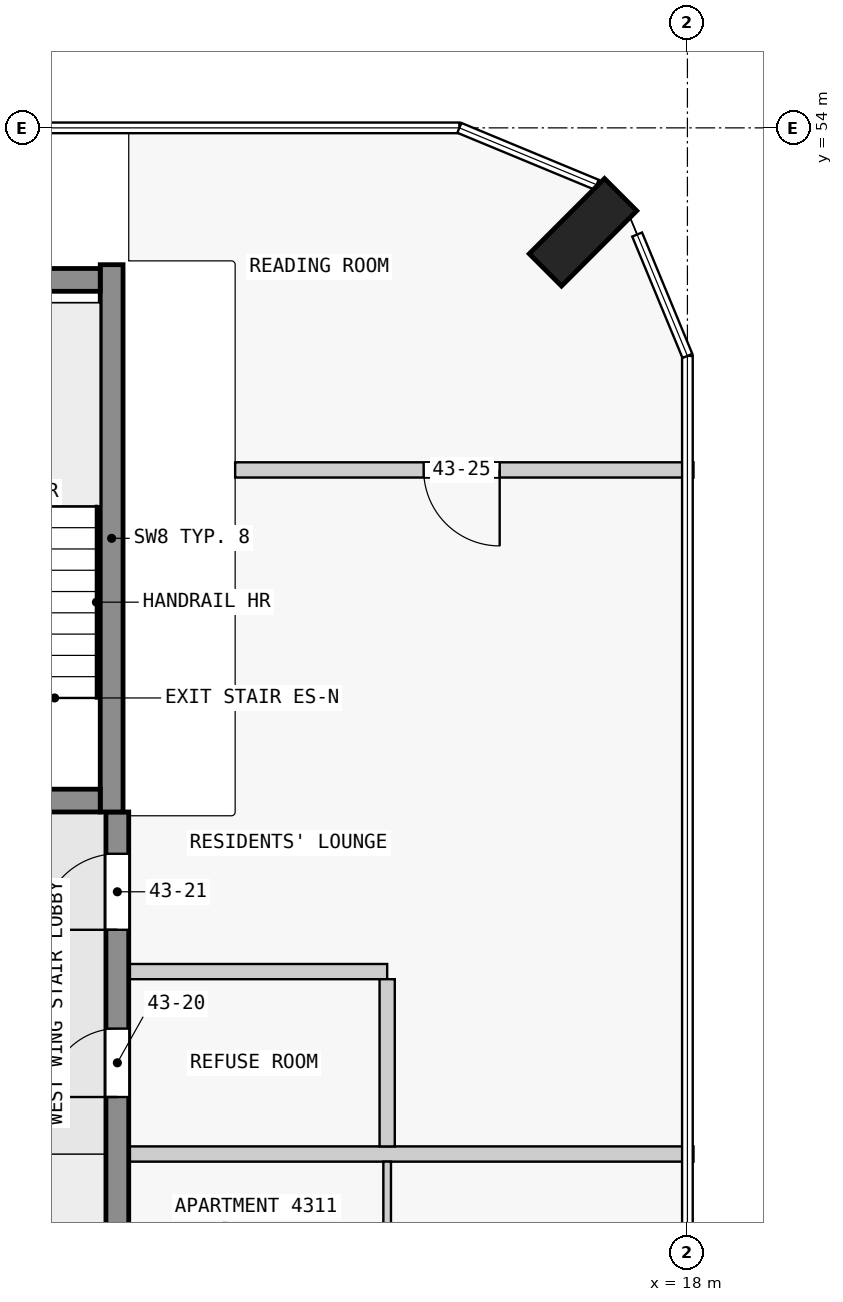
"""IFC4 building model, lengths in metres.
Left out: names, types, materials, properties, quantities, classifications, styles, units other than length and angle.
Written with IfcOpenShell. Run it as: python <this file> out.ifc"""

import sys

from ifc_helpers import new_model, si_unit, direction, frame, frame_2d, origin, origin_2d, place, context, subcontext, project, spatial, rectangle, extrude, element, fill, save


model = new_model("IFC4")
c1 = context("Model", 3, precision=1e-05, world=origin(), true_north=direction((0.0, 1.0)))
c2 = subcontext(c1, "Body", "Model", "MODEL_VIEW")
j1 = project(units=[si_unit("LENGTHUNIT", "METRE"), si_unit("PLANEANGLEUNIT", "RADIAN")], contexts=[c1])
p1 = place(None, origin())
s1 = spatial("IfcSite", under=j1, at=p1, CompositionType="ELEMENT")
p2 = place(p1, origin())
s2 = spatial("IfcBuilding", under=s1, at=p2, CompositionType="ELEMENT")
p3 = place(p2, frame((0.0, 0.0, 167.4)))
s3 = spatial("IfcBuildingStorey", under=s2, at=p3, CompositionType="ELEMENT", Elevation=167.4)
p4 = place(p3, frame((16.626, 52.626, 0.0), z_axis=(0.0, 0.0, 1.0), x_axis=(-0.707106781187, 0.707106781187, 0.0)))
e1 = element("IfcColumn", 1, at=p4, inside=s3, PredefinedType="COLUMN", context=c2, shape_type="SweptSolid", body=[
    extrude(rectangle(XDim=0.6, YDim=1.4, at=origin_2d()), origin(), (0.0, 0.0, 1.0), 3.5),
])
p5 = place(p3, frame((7.725, 45.15, 0.0), z_axis=(0.0, 0.0, 1.0), x_axis=(1.0, 0.0, 0.0)))
e2 = element("IfcWall", 2, at=p5, inside=s3, PredefinedType="SHEAR", context=c2, shape_type="SweptSolid", body=[
    extrude(rectangle(XDim=2.55, YDim=0.3, at=frame_2d((1.275, 0.0))), origin(), (0.0, 0.0, 1.0), 3.5),
])
p6 = place(p5, frame((0.725, 0.0, 0.0)))
e3 = element("IfcOpeningElement", 3, at=p6, cuts=e2, PredefinedType="OPENING", context=c2, shape_type="SweptSolid", body=[
    extrude(rectangle(XDim=1.1, YDim=2.1, at=frame_2d((0.55, 1.05))), frame((0.0, 0.16, 0.0), z_axis=(0.0, -1.0, 0.0), x_axis=(1.0, 0.0, 0.0)), (0.0, 0.0, 1.0), 0.32),
])
p7 = place(p3, frame((7.725, 52.0, 0.0), z_axis=(0.0, 0.0, 1.0), x_axis=(1.0, 0.0, 0.0)))
e4 = element("IfcWall", 4, at=p7, inside=s3, PredefinedType="SHEAR", context=c2, shape_type="SweptSolid", body=[
    extrude(rectangle(XDim=2.55, YDim=0.3, at=frame_2d((1.275, 0.0))), origin(), (0.0, 0.0, 1.0), 3.5),
])
p8 = place(p3, frame((10.425, 45.0, 0.0), z_axis=(0.0, 0.0, 1.0), x_axis=(0.0, 1.0, 0.0)))
e5 = element("IfcWall", 5, at=p8, inside=s3, PredefinedType="SHEAR", context=c2, shape_type="SweptSolid", body=[
    extrude(rectangle(XDim=7.2, YDim=0.3, at=frame_2d((3.6, 0.0))), origin(), (0.0, 0.0, 1.0), 3.5),
])
p9 = place(p3, frame((10.5, 18.0, 0.0), z_axis=(0.0, 0.0, 1.0), x_axis=(0.0, 1.0, 0.0)))
e6 = element("IfcWall", 6, at=p9, inside=s3, PredefinedType="SHEAR", context=c2, shape_type="SweptSolid", body=[
    extrude(rectangle(XDim=27.0, YDim=0.3, at=frame_2d((13.5, 0.0))), origin(), (0.0, 0.0, 1.0), 3.25),
])
p10 = place(p9, frame((1.75, 0.0, 0.0)))
e7 = element("IfcOpeningElement", 7, at=p10, cuts=e6, PredefinedType="OPENING", context=c2, shape_type="SweptSolid", body=[
    extrude(rectangle(XDim=1.0, YDim=2.1, at=frame_2d((0.5, 1.05))), frame((0.0, 0.16, 0.0), z_axis=(0.0, -1.0, 0.0), x_axis=(1.0, 0.0, 0.0)), (0.0, 0.0, 1.0), 0.32),
])
p11 = place(p9, frame((6.25, 0.0, 0.0)))
e8 = element("IfcOpeningElement", 8, at=p11, cuts=e6, PredefinedType="OPENING", context=c2, shape_type="SweptSolid", body=[
    extrude(rectangle(XDim=1.0, YDim=2.1, at=frame_2d((0.5, 1.05))), frame((0.0, 0.16, 0.0), z_axis=(0.0, -1.0, 0.0), x_axis=(1.0, 0.0, 0.0)), (0.0, 0.0, 1.0), 0.32),
])
p12 = place(p9, frame((10.35, 0.0, 0.0)))
e9 = element("IfcOpeningElement", 9, at=p12, cuts=e6, PredefinedType="OPENING", context=c2, shape_type="SweptSolid", body=[
    extrude(rectangle(XDim=1.8, YDim=2.1, at=frame_2d((0.9, 1.05))), frame((0.0, 0.16, 0.0), z_axis=(0.0, -1.0, 0.0), x_axis=(1.0, 0.0, 0.0)), (0.0, 0.0, 1.0), 0.32),
])
p13 = place(p9, frame((17.55, 0.0, 0.0)))
e10 = element("IfcOpeningElement", 10, at=p13, cuts=e6, PredefinedType="OPENING", context=c2, shape_type="SweptSolid", body=[
    extrude(rectangle(XDim=1.0, YDim=2.1, at=frame_2d((0.5, 1.05))), frame((0.0, 0.16, 0.0), z_axis=(0.0, -1.0, 0.0), x_axis=(1.0, 0.0, 0.0)), (0.0, 0.0, 1.0), 0.32),
])
p14 = place(p9, frame((23.25, 0.0, 0.0)))
e11 = element("IfcOpeningElement", 11, at=p14, cuts=e6, PredefinedType="OPENING", context=c2, shape_type="SweptSolid", body=[
    extrude(rectangle(XDim=0.9, YDim=2.1, at=frame_2d((0.45, 1.05))), frame((0.0, 0.16, 0.0), z_axis=(0.0, -1.0, 0.0), x_axis=(1.0, 0.0, 0.0)), (0.0, 0.0, 1.0), 0.32),
])
p15 = place(p9, frame((25.45, 0.0, 0.0)))
e12 = element("IfcOpeningElement", 12, at=p15, cuts=e6, PredefinedType="OPENING", context=c2, shape_type="SweptSolid", body=[
    extrude(rectangle(XDim=1.0, YDim=2.1, at=frame_2d((0.5, 1.05))), frame((0.0, 0.16, 0.0), z_axis=(0.0, -1.0, 0.0), x_axis=(1.0, 0.0, 0.0)), (0.0, 0.0, 1.0), 0.32),
])
p16 = place(p3, frame((18.08, 40.5, 0.0), z_axis=(0.0, 0.0, 1.0), x_axis=(-1.0, 0.0, 0.0)))
e13 = element("IfcWall", 13, at=p16, inside=s3, PredefinedType="PARTITIONING", context=c2, shape_type="SweptSolid", body=[
    extrude(rectangle(XDim=7.43, YDim=0.2, at=frame_2d((3.715, 0.0))), origin(), (0.0, 0.0, 1.0), 3.25),
])
p17 = place(p3, frame((14.05, 42.9, 0.0), z_axis=(0.0, 0.0, 1.0), x_axis=(-1.0, 0.0, 0.0)))
e14 = element("IfcWall", 14, at=p17, inside=s3, PredefinedType="PARTITIONING", context=c2, shape_type="SweptSolid", body=[
    extrude(rectangle(XDim=3.4, YDim=0.2, at=frame_2d((1.7, 0.0))), origin(), (0.0, 0.0, 1.0), 3.25),
])
p18 = place(p3, frame((18.08, 49.5, 0.0), z_axis=(0.0, 0.0, 1.0), x_axis=(-1.0, 0.0, 0.0)))
e15 = element("IfcWall", 15, at=p18, inside=s3, PredefinedType="PARTITIONING", context=c2, shape_type="SweptSolid", body=[
    extrude(rectangle(XDim=6.03, YDim=0.2, at=frame_2d((3.015, 0.0))), origin(), (0.0, 0.0, 1.0), 3.25),
])
p19 = place(p18, frame((2.55, 0.0, 0.0)))
e16 = element("IfcOpeningElement", 16, at=p19, cuts=e15, PredefinedType="OPENING", context=c2, shape_type="SweptSolid", body=[
    extrude(rectangle(XDim=1.0, YDim=2.1, at=frame_2d((0.5, 1.05))), frame((0.0, 0.11, 0.0), z_axis=(0.0, -1.0, 0.0), x_axis=(1.0, 0.0, 0.0)), (0.0, 0.0, 1.0), 0.22),
])
p20 = place(p3, frame((14.05, 38.75, 0.0), z_axis=(0.0, 0.0, 1.0), x_axis=(0.0, 1.0, 0.0)))
e17 = element("IfcWall", 17, at=p20, inside=s3, PredefinedType="PARTITIONING", context=c2, shape_type="SweptSolid", body=[
    extrude(rectangle(XDim=1.65, YDim=0.1, at=frame_2d((0.825, 0.0))), origin(), (0.0, 0.0, 1.0), 3.25),
])
p21 = place(p3, frame((14.05, 40.6, 0.0), z_axis=(0.0, 0.0, 1.0), x_axis=(0.0, 1.0, 0.0)))
e18 = element("IfcWall", 18, at=p21, inside=s3, PredefinedType="PARTITIONING", context=c2, shape_type="SweptSolid", body=[
    extrude(rectangle(XDim=2.2, YDim=0.2, at=frame_2d((1.1, 0.0))), origin(), (0.0, 0.0, 1.0), 3.25),
])
p22 = place(p14, origin())
e19 = element("IfcDoor", 19, at=p22, inside=s3, OperationType="SINGLE_SWING_RIGHT", PredefinedType="DOOR", context=c2, shape_type="SweptSolid", body=[
    extrude(rectangle(XDim=0.9, YDim=2.1, at=frame_2d((0.45, 1.05))), frame((0.0, 0.025, 0.0), z_axis=(0.0, -1.0, 0.0), x_axis=(1.0, 0.0, 0.0)), (0.0, 0.0, 1.0), 0.05),
])
fill(e11, e19)
p23 = place(p15, origin())
e20 = element("IfcDoor", 20, at=p23, inside=s3, OperationType="SINGLE_SWING_RIGHT", PredefinedType="DOOR", context=c2, shape_type="SweptSolid", body=[
    extrude(rectangle(XDim=1.0, YDim=2.1, at=frame_2d((0.5, 1.05))), frame((0.0, 0.025, 0.0), z_axis=(0.0, -1.0, 0.0), x_axis=(1.0, 0.0, 0.0)), (0.0, 0.0, 1.0), 0.05),
])
fill(e12, e20)
p24 = place(p19, origin())
e21 = element("IfcDoor", 21, at=p24, inside=s3, OperationType="SINGLE_SWING_RIGHT", PredefinedType="DOOR", context=c2, shape_type="SweptSolid", body=[
    extrude(rectangle(XDim=1.0, YDim=2.1, at=frame_2d((0.5, 1.05))), frame((0.0, 0.025, 0.0), z_axis=(0.0, -1.0, 0.0), x_axis=(1.0, 0.0, 0.0)), (0.0, 0.0, 1.0), 0.05),
])
fill(e16, e21)
save(model, sys.argv[1])
